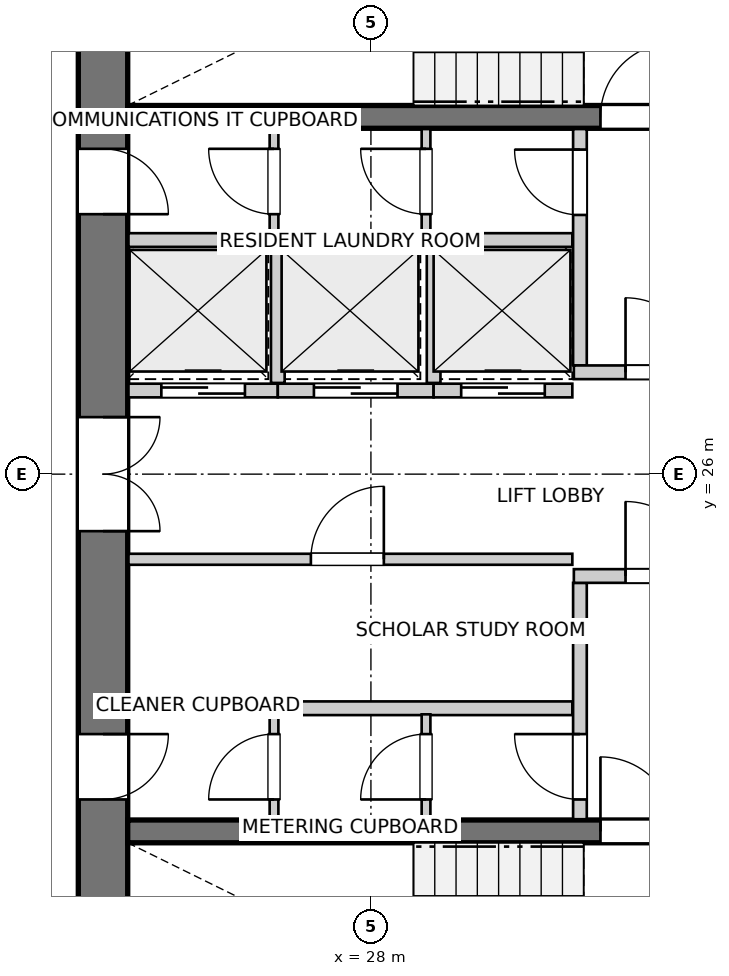
"""IFC4 building model, lengths in metres.
Left out: names, types, materials, properties, quantities, classifications, styles, units other than length and angle.
Written with IfcOpenShell. Run it as: python <this file> out.ifc"""

import sys

from ifc_helpers import new_model, si_unit, direction, frame, frame_2d, origin, place, context, subcontext, project, spatial, rectangle, extrude, source, transform, mapped, element, fill, save


model = new_model("IFC4")
c1 = context("Model", 3, precision=1e-05, world=origin(), true_north=direction((0.0, 1.0)))
c2 = subcontext(c1, "Body", "Model", "MODEL_VIEW")
j1 = project(units=[si_unit("LENGTHUNIT", "METRE"), si_unit("PLANEANGLEUNIT", "RADIAN")], contexts=[c1])
p1 = place(None, origin())
s1 = spatial("IfcSite", under=j1, at=p1, CompositionType="ELEMENT")
p2 = place(p1, origin())
s2 = spatial("IfcBuilding", under=s1, at=p2, CompositionType="ELEMENT")
p3 = place(p2, frame((0.0, 0.0, 152.2)))
s3 = spatial("IfcBuildingStorey", under=s2, at=p3, CompositionType="ELEMENT", Elevation=152.2)
p4 = place(p3, frame((24.475, 33.8, 0.0), z_axis=(0.0, 0.0, 1.0), x_axis=(0.0, -1.0, 0.0)))
e1 = element("IfcWall", 1, at=p4, inside=s3, PredefinedType="SHEAR", context=c2, shape_type="SweptSolid", body=[
    extrude(rectangle(XDim=15.6, YDim=0.65, at=frame_2d((7.8, 0.0))), origin(), (0.0, 0.0, 1.0), 2.935),
])
p5 = place(p4, frame((7.05, 0.0, 0.0)))
e2 = element("IfcOpeningElement", 2, at=p5, cuts=e1, PredefinedType="OPENING", context=c2, shape_type="SweptSolid", body=[
    extrude(rectangle(XDim=1.5, YDim=2.15, at=frame_2d((0.75, 1.075))), frame((0.0, 0.335, 0.0), z_axis=(0.0, -1.0, 0.0), x_axis=(1.0, 0.0, 0.0)), (0.0, 0.0, 1.0), 0.67),
])
p6 = place(p4, frame((3.52, 0.0, 0.0)))
e3 = element("IfcOpeningElement", 3, at=p6, cuts=e1, PredefinedType="OPENING", context=c2, shape_type="SweptSolid", body=[
    extrude(rectangle(XDim=0.86, YDim=2.05, at=frame_2d((0.43, 1.025))), frame((0.0, 0.335, 0.0), z_axis=(0.0, -1.0, 0.0), x_axis=(1.0, 0.0, 0.0)), (0.0, 0.0, 1.0), 0.67),
])
p7 = place(p4, frame((11.22, 0.0, 0.0)))
e4 = element("IfcOpeningElement", 4, at=p7, cuts=e1, PredefinedType="OPENING", context=c2, shape_type="SweptSolid", body=[
    extrude(rectangle(XDim=0.86, YDim=2.05, at=frame_2d((0.43, 1.025))), frame((0.0, 0.335, 0.0), z_axis=(0.0, -1.0, 0.0), x_axis=(1.0, 0.0, 0.0)), (0.0, 0.0, 1.0), 0.67),
])
p8 = place(p3, frame((24.8, 21.3, 0.0), z_axis=(0.0, 0.0, 1.0), x_axis=(1.0, 0.0, 0.0)))
e5 = element("IfcWall", 5, at=p8, inside=s3, PredefinedType="SHEAR", context=c2, shape_type="SweptSolid", body=[
    extrude(rectangle(XDim=11.1, YDim=0.3, at=frame_2d((5.55, 0.0))), origin(), (0.0, 0.0, 1.0), 2.935),
])
p9 = place(p8, frame((6.22, 0.0, 0.0)))
e6 = element("IfcOpeningElement", 6, at=p9, cuts=e5, PredefinedType="OPENING", context=c2, shape_type="SweptSolid", body=[
    extrude(rectangle(XDim=0.98, YDim=2.15, at=frame_2d((0.49, 1.075))), frame((0.0, 0.16, 0.0), z_axis=(0.0, -1.0, 0.0), x_axis=(1.0, 0.0, 0.0)), (0.0, 0.0, 1.0), 0.32),
])
p10 = place(p8, frame((9.15, 0.0, 0.0)))
e7 = element("IfcOpeningElement", 7, at=p10, cuts=e5, PredefinedType="OPENING", context=c2, shape_type="SweptSolid", body=[
    extrude(rectangle(XDim=1.15, YDim=2.15, at=frame_2d((0.575, 1.075))), frame((0.0, 0.16, 0.0), z_axis=(0.0, -1.0, 0.0), x_axis=(1.0, 0.0, 0.0)), (0.0, 0.0, 1.0), 0.32),
])
p11 = place(p3, frame((24.8, 30.7, 0.0), z_axis=(0.0, 0.0, 1.0), x_axis=(1.0, 0.0, 0.0)))
e8 = element("IfcWall", 8, at=p11, inside=s3, PredefinedType="SHEAR", context=c2, shape_type="SweptSolid", body=[
    extrude(rectangle(XDim=11.1, YDim=0.3, at=frame_2d((5.55, 0.0))), origin(), (0.0, 0.0, 1.0), 2.935),
])
p12 = place(p11, frame((6.22, 0.0, 0.0)))
e9 = element("IfcOpeningElement", 9, at=p12, cuts=e8, PredefinedType="OPENING", context=c2, shape_type="SweptSolid", body=[
    extrude(rectangle(XDim=0.98, YDim=2.15, at=frame_2d((0.49, 1.075))), frame((0.0, 0.16, 0.0), z_axis=(0.0, -1.0, 0.0), x_axis=(1.0, 0.0, 0.0)), (0.0, 0.0, 1.0), 0.32),
])
p13 = place(p11, frame((9.15, 0.0, 0.0)))
e10 = element("IfcOpeningElement", 10, at=p13, cuts=e8, PredefinedType="OPENING", context=c2, shape_type="SweptSolid", body=[
    extrude(rectangle(XDim=1.15, YDim=2.15, at=frame_2d((0.575, 1.075))), frame((0.0, 0.16, 0.0), z_axis=(0.0, -1.0, 0.0), x_axis=(1.0, 0.0, 0.0)), (0.0, 0.0, 1.0), 0.32),
])
p14 = place(p3, frame((30.75, 21.46, 0.0), z_axis=(0.0, 0.0, 1.0), x_axis=(0.0, 1.0, 0.0)))
e11 = element("IfcWall", 11, at=p14, inside=s3, PredefinedType="PARTITIONING", context=c2, shape_type="SweptSolid", body=[
    extrude(rectangle(XDim=3.11, YDim=0.18, at=frame_2d((1.555, 0.0))), origin(), (0.0, 0.0, 1.0), 2.935),
])
p15 = place(p14, frame((0.26, 0.0, 0.0)))
e12 = element("IfcOpeningElement", 12, at=p15, cuts=e11, PredefinedType="OPENING", context=c2, shape_type="SweptSolid", body=[
    extrude(rectangle(XDim=0.86, YDim=2.05, at=frame_2d((0.43, 1.025))), frame((0.0, 0.1, 0.0), z_axis=(0.0, -1.0, 0.0), x_axis=(1.0, 0.0, 0.0)), (0.0, 0.0, 1.0), 0.2),
])
p16 = place(p3, frame((30.67, 24.66, 0.0), z_axis=(0.0, 0.0, 1.0), x_axis=(1.0, 0.0, 0.0)))
e13 = element("IfcWall", 13, at=p16, inside=s3, PredefinedType="PARTITIONING", context=c2, shape_type="SweptSolid", body=[
    extrude(rectangle(XDim=5.22, YDim=0.18, at=frame_2d((2.61, 0.0))), origin(), (0.0, 0.0, 1.0), 2.935),
])
p17 = place(p16, frame((0.68, 0.0, 0.0)))
e14 = element("IfcOpeningElement", 14, at=p17, cuts=e13, PredefinedType="OPENING", context=c2, shape_type="SweptSolid", body=[
    extrude(rectangle(XDim=0.98, YDim=2.15, at=frame_2d((0.49, 1.075))), frame((0.0, 0.1, 0.0), z_axis=(0.0, -1.0, 0.0), x_axis=(1.0, 0.0, 0.0)), (0.0, 0.0, 1.0), 0.2),
])
p18 = place(p3, frame((30.75, 27.43, 0.0), z_axis=(0.0, 0.0, 1.0), x_axis=(0.0, 1.0, 0.0)))
e15 = element("IfcWall", 15, at=p18, inside=s3, PredefinedType="PARTITIONING", context=c2, shape_type="SweptSolid", body=[
    extrude(rectangle(XDim=3.11, YDim=0.18, at=frame_2d((1.555, 0.0))), origin(), (0.0, 0.0, 1.0), 2.935),
])
p19 = place(p18, frame((1.98, 0.0, 0.0)))
e16 = element("IfcOpeningElement", 16, at=p19, cuts=e15, PredefinedType="OPENING", context=c2, shape_type="SweptSolid", body=[
    extrude(rectangle(XDim=0.86, YDim=2.05, at=frame_2d((0.43, 1.025))), frame((0.0, 0.1, 0.0), z_axis=(0.0, -1.0, 0.0), x_axis=(1.0, 0.0, 0.0)), (0.0, 0.0, 1.0), 0.2),
])
p20 = place(p3, frame((30.67, 27.34, 0.0), z_axis=(0.0, 0.0, 1.0), x_axis=(1.0, 0.0, 0.0)))
e17 = element("IfcWall", 17, at=p20, inside=s3, PredefinedType="PARTITIONING", context=c2, shape_type="SweptSolid", body=[
    extrude(rectangle(XDim=5.22, YDim=0.18, at=frame_2d((2.61, 0.0))), origin(), (0.0, 0.0, 1.0), 2.935),
])
p21 = place(p20, frame((0.68, 0.0, 0.0)))
e18 = element("IfcOpeningElement", 18, at=p21, cuts=e17, PredefinedType="OPENING", context=c2, shape_type="SweptSolid", body=[
    extrude(rectangle(XDim=0.98, YDim=2.15, at=frame_2d((0.49, 1.075))), frame((0.0, 0.1, 0.0), z_axis=(0.0, -1.0, 0.0), x_axis=(1.0, 0.0, 0.0)), (0.0, 0.0, 1.0), 0.2),
])
p22 = place(p3, frame((24.81, 22.92, 0.0), z_axis=(0.0, 0.0, 1.0), x_axis=(1.0, 0.0, 0.0)))
e19 = element("IfcWall", 19, at=p22, inside=s3, PredefinedType="PARTITIONING", context=c2, shape_type="SweptSolid", body=[
    extrude(rectangle(XDim=5.84, YDim=0.18, at=frame_2d((2.92, 0.0))), origin(), (0.0, 0.0, 1.0), 2.935),
])
p23 = place(p3, frame((24.81, 24.88, 0.0), z_axis=(0.0, 0.0, 1.0), x_axis=(1.0, 0.0, 0.0)))
e20 = element("IfcWall", 20, at=p23, inside=s3, PredefinedType="PARTITIONING", context=c2, shape_type="SweptSolid", body=[
    extrude(rectangle(XDim=5.84, YDim=0.145, at=frame_2d((2.92, 0.0))), origin(), (0.0, 0.0, 1.0), 2.935),
])
p24 = place(p23, frame((2.4, 0.0, 0.0)))
e21 = element("IfcOpeningElement", 21, at=p24, cuts=e20, PredefinedType="OPENING", context=c2, shape_type="SweptSolid", body=[
    extrude(rectangle(XDim=0.96, YDim=2.1, at=frame_2d((0.48, 1.05))), frame((0.0, 0.083, 0.0), z_axis=(0.0, -1.0, 0.0), x_axis=(1.0, 0.0, 0.0)), (0.0, 0.0, 1.0), 0.165),
])
p25 = place(p3, frame((24.81, 29.08, 0.0), z_axis=(0.0, 0.0, 1.0), x_axis=(1.0, 0.0, 0.0)))
e22 = element("IfcWall", 22, at=p25, inside=s3, PredefinedType="PARTITIONING", context=c2, shape_type="SweptSolid", body=[
    extrude(rectangle(XDim=5.84, YDim=0.18, at=frame_2d((2.92, 0.0))), origin(), (0.0, 0.0, 1.0), 2.935),
])
p26 = place(p3, frame((24.81, 27.1, 0.0), z_axis=(0.0, 0.0, 1.0), x_axis=(1.0, 0.0, 0.0)))
e23 = element("IfcWall", 23, at=p26, inside=s3, PredefinedType="PARTITIONING", context=c2, shape_type="SweptSolid", body=[
    extrude(rectangle(XDim=1.965, YDim=0.18, at=frame_2d((0.982, 0.0))), origin(), (0.0, 0.0, 1.0), 2.935),
])
p27 = place(p26, frame((0.433, 0.0, 0.0)))
e24 = element("IfcOpeningElement", 24, at=p27, cuts=e23, PredefinedType="OPENING", context=c2, shape_type="SweptSolid", body=[
    extrude(rectangle(XDim=1.1, YDim=2.15, at=frame_2d((0.55, 1.075))), frame((0.0, 0.1, 0.0), z_axis=(0.0, -1.0, 0.0), x_axis=(1.0, 0.0, 0.0)), (0.0, 0.0, 1.0), 0.2),
])
p28 = place(p3, frame((26.775, 27.1, 0.0), z_axis=(0.0, 0.0, 1.0), x_axis=(1.0, 0.0, 0.0)))
e25 = element("IfcWall", 25, at=p28, inside=s3, PredefinedType="PARTITIONING", context=c2, shape_type="SweptSolid", body=[
    extrude(rectangle(XDim=2.05, YDim=0.18, at=frame_2d((1.025, 0.0))), origin(), (0.0, 0.0, 1.0), 2.935),
])
p29 = place(p28, frame((0.475, 0.0, 0.0)))
e26 = element("IfcOpeningElement", 26, at=p29, cuts=e25, PredefinedType="OPENING", context=c2, shape_type="SweptSolid", body=[
    extrude(rectangle(XDim=1.1, YDim=2.15, at=frame_2d((0.55, 1.075))), frame((0.0, 0.1, 0.0), z_axis=(0.0, -1.0, 0.0), x_axis=(1.0, 0.0, 0.0)), (0.0, 0.0, 1.0), 0.2),
])
p30 = place(p3, frame((26.775, 27.2, 0.0), z_axis=(0.0, 0.0, 1.0), x_axis=(0.0, 1.0, 0.0)))
e27 = element("IfcWall", 27, at=p30, inside=s3, PredefinedType="PARTITIONING", context=c2, shape_type="SweptSolid", body=[
    extrude(rectangle(XDim=1.78, YDim=0.18, at=frame_2d((0.89, 0.0))), origin(), (0.0, 0.0, 1.0), 2.935),
])
p31 = place(p3, frame((28.825, 27.1, 0.0), z_axis=(0.0, 0.0, 1.0), x_axis=(1.0, 0.0, 0.0)))
e28 = element("IfcWall", 28, at=p31, inside=s3, PredefinedType="PARTITIONING", context=c2, shape_type="SweptSolid", body=[
    extrude(rectangle(XDim=1.825, YDim=0.18, at=frame_2d((0.913, 0.0))), origin(), (0.0, 0.0, 1.0), 2.935),
])
p32 = place(p31, frame((0.363, 0.0, 0.0)))
e29 = element("IfcOpeningElement", 29, at=p32, cuts=e28, PredefinedType="OPENING", context=c2, shape_type="SweptSolid", body=[
    extrude(rectangle(XDim=1.1, YDim=2.15, at=frame_2d((0.55, 1.075))), frame((0.0, 0.1, 0.0), z_axis=(0.0, -1.0, 0.0), x_axis=(1.0, 0.0, 0.0)), (0.0, 0.0, 1.0), 0.2),
])
p33 = place(p3, frame((28.825, 27.2, 0.0), z_axis=(0.0, 0.0, 1.0), x_axis=(0.0, 1.0, 0.0)))
e30 = element("IfcWall", 30, at=p33, inside=s3, PredefinedType="PARTITIONING", context=c2, shape_type="SweptSolid", body=[
    extrude(rectangle(XDim=1.78, YDim=0.18, at=frame_2d((0.89, 0.0))), origin(), (0.0, 0.0, 1.0), 2.935),
])
p34 = place(p3, frame((26.725, 21.46, 0.0), z_axis=(0.0, 0.0, 1.0), x_axis=(0.0, 1.0, 0.0)))
e31 = element("IfcWall", 31, at=p34, inside=s3, PredefinedType="PARTITIONING", context=c2, shape_type="SweptSolid", body=[
    extrude(rectangle(XDim=1.38, YDim=0.115, at=frame_2d((0.69, 0.0))), origin(), (0.0, 0.0, 1.0), 2.935),
])
p35 = place(p34, frame((0.26, 0.0, 0.0)))
e32 = element("IfcOpeningElement", 32, at=p35, cuts=e31, PredefinedType="OPENING", context=c2, shape_type="SweptSolid", body=[
    extrude(rectangle(XDim=0.86, YDim=2.05, at=frame_2d((0.43, 1.025))), frame((0.0, 0.067, 0.0), z_axis=(0.0, -1.0, 0.0), x_axis=(1.0, 0.0, 0.0)), (0.0, 0.0, 1.0), 0.135),
])
p36 = place(p3, frame((26.725, 29.16, 0.0), z_axis=(0.0, 0.0, 1.0), x_axis=(0.0, 1.0, 0.0)))
e33 = element("IfcWall", 33, at=p36, inside=s3, PredefinedType="PARTITIONING", context=c2, shape_type="SweptSolid", body=[
    extrude(rectangle(XDim=1.38, YDim=0.115, at=frame_2d((0.69, 0.0))), origin(), (0.0, 0.0, 1.0), 2.935),
])
p37 = place(p36, frame((0.26, 0.0, 0.0)))
e34 = element("IfcOpeningElement", 34, at=p37, cuts=e33, PredefinedType="OPENING", context=c2, shape_type="SweptSolid", body=[
    extrude(rectangle(XDim=0.86, YDim=2.05, at=frame_2d((0.43, 1.025))), frame((0.0, 0.067, 0.0), z_axis=(0.0, -1.0, 0.0), x_axis=(1.0, 0.0, 0.0)), (0.0, 0.0, 1.0), 0.135),
])
p38 = place(p3, frame((28.725, 21.46, 0.0), z_axis=(0.0, 0.0, 1.0), x_axis=(0.0, 1.0, 0.0)))
e35 = element("IfcWall", 35, at=p38, inside=s3, PredefinedType="PARTITIONING", context=c2, shape_type="SweptSolid", body=[
    extrude(rectangle(XDim=1.38, YDim=0.115, at=frame_2d((0.69, 0.0))), origin(), (0.0, 0.0, 1.0), 2.935),
])
p39 = place(p38, frame((0.26, 0.0, 0.0)))
e36 = element("IfcOpeningElement", 36, at=p39, cuts=e35, PredefinedType="OPENING", context=c2, shape_type="SweptSolid", body=[
    extrude(rectangle(XDim=0.86, YDim=2.05, at=frame_2d((0.43, 1.025))), frame((0.0, 0.067, 0.0), z_axis=(0.0, -1.0, 0.0), x_axis=(1.0, 0.0, 0.0)), (0.0, 0.0, 1.0), 0.135),
])
p40 = place(p3, frame((28.725, 29.16, 0.0), z_axis=(0.0, 0.0, 1.0), x_axis=(0.0, 1.0, 0.0)))
e37 = element("IfcWall", 37, at=p40, inside=s3, PredefinedType="PARTITIONING", context=c2, shape_type="SweptSolid", body=[
    extrude(rectangle(XDim=1.38, YDim=0.115, at=frame_2d((0.69, 0.0))), origin(), (0.0, 0.0, 1.0), 2.935),
])
p41 = place(p40, frame((0.26, 0.0, 0.0)))
e38 = element("IfcOpeningElement", 38, at=p41, cuts=e37, PredefinedType="OPENING", context=c2, shape_type="SweptSolid", body=[
    extrude(rectangle(XDim=0.86, YDim=2.05, at=frame_2d((0.43, 1.025))), frame((0.0, 0.067, 0.0), z_axis=(0.0, -1.0, 0.0), x_axis=(1.0, 0.0, 0.0)), (0.0, 0.0, 1.0), 0.135),
])
m1 = source(origin(), c2, "Body", "SweptSolid", [
    extrude(rectangle(XDim=0.98, YDim=2.15, at=frame_2d((0.49, 1.075))), frame((0.0, 0.025, 0.0), z_axis=(0.0, -1.0, 0.0), x_axis=(1.0, 0.0, 0.0)), (0.0, 0.0, 1.0), 0.05),
])
p42 = place(p9, origin())
e39 = element("IfcDoor", 39, at=p42, inside=s3, OperationType="SINGLE_SWING_LEFT", PredefinedType="DOOR", context=c2, shape_type="MappedRepresentation", body=[
    mapped(m1, transform((0.0, 0.0, 0.0), x_axis=(1.0, 0.0, 0.0), y_axis=(0.0, 1.0, 0.0), z_axis=(0.0, 0.0, 1.0), scale=1.0)),
])
fill(e6, e39)
p43 = place(p12, origin())
e40 = element("IfcDoor", 40, at=p43, inside=s3, OperationType="SINGLE_SWING_RIGHT", PredefinedType="DOOR", context=c2, shape_type="MappedRepresentation", body=[
    mapped(m1, transform((0.0, 0.0, 0.0), x_axis=(1.0, 0.0, 0.0), y_axis=(0.0, 1.0, 0.0), z_axis=(0.0, 0.0, 1.0), scale=1.0)),
])
fill(e9, e40)
m2 = source(origin(), c2, "Body", "SweptSolid", [
    extrude(rectangle(XDim=1.5, YDim=2.15, at=frame_2d((0.75, 1.075))), frame((0.0, 0.025, 0.0), z_axis=(0.0, -1.0, 0.0), x_axis=(1.0, 0.0, 0.0)), (0.0, 0.0, 1.0), 0.05),
])
p44 = place(p5, origin())
e41 = element("IfcDoor", 41, at=p44, inside=s3, OperationType="DOUBLE_DOOR_SINGLE_SWING", PredefinedType="DOOR", context=c2, shape_type="MappedRepresentation", body=[
    mapped(m2, transform((0.0, 0.0, 0.0), x_axis=(1.0, 0.0, 0.0), y_axis=(0.0, 1.0, 0.0), z_axis=(0.0, 0.0, 1.0), scale=1.0)),
])
fill(e2, e41)
m3 = source(origin(), c2, "Body", "SweptSolid", [
    extrude(rectangle(XDim=0.86, YDim=2.05, at=frame_2d((0.43, 1.025))), frame((0.0, 0.025, 0.0), z_axis=(0.0, -1.0, 0.0), x_axis=(1.0, 0.0, 0.0)), (0.0, 0.0, 1.0), 0.05),
])
p45 = place(p6, origin())
e42 = element("IfcDoor", 42, at=p45, inside=s3, OperationType="SINGLE_SWING_RIGHT", PredefinedType="DOOR", context=c2, shape_type="MappedRepresentation", body=[
    mapped(m3, transform((0.0, 0.0, 0.0), x_axis=(1.0, 0.0, 0.0), y_axis=(0.0, 1.0, 0.0), z_axis=(0.0, 0.0, 1.0), scale=1.0)),
])
fill(e3, e42)
p46 = place(p7, origin())
e43 = element("IfcDoor", 43, at=p46, inside=s3, OperationType="SINGLE_SWING_LEFT", PredefinedType="DOOR", context=c2, shape_type="MappedRepresentation", body=[
    mapped(m3, transform((0.0, 0.0, 0.0), x_axis=(1.0, 0.0, 0.0), y_axis=(0.0, 1.0, 0.0), z_axis=(0.0, 0.0, 1.0), scale=1.0)),
])
fill(e4, e43)
p47 = place(p15, origin())
e44 = element("IfcDoor", 44, at=p47, inside=s3, OperationType="SINGLE_SWING_RIGHT", PredefinedType="DOOR", context=c2, shape_type="MappedRepresentation", body=[
    mapped(m3, transform((0.0, 0.0, 0.0), x_axis=(1.0, 0.0, 0.0), y_axis=(0.0, 1.0, 0.0), z_axis=(0.0, 0.0, 1.0), scale=1.0)),
])
fill(e12, e44)
p48 = place(p17, origin())
e45 = element("IfcDoor", 45, at=p48, inside=s3, OperationType="SINGLE_SWING_LEFT", PredefinedType="DOOR", context=c2, shape_type="MappedRepresentation", body=[
    mapped(m1, transform((0.0, 0.0, 0.0), x_axis=(1.0, 0.0, 0.0), y_axis=(0.0, 1.0, 0.0), z_axis=(0.0, 0.0, 1.0), scale=1.0)),
])
fill(e14, e45)
p49 = place(p19, origin())
e46 = element("IfcDoor", 46, at=p49, inside=s3, OperationType="SINGLE_SWING_RIGHT", PredefinedType="DOOR", context=c2, shape_type="MappedRepresentation", body=[
    mapped(m3, transform((0.0, 0.0, 0.0), x_axis=(1.0, 0.0, 0.0), y_axis=(0.0, 1.0, 0.0), z_axis=(0.0, 0.0, 1.0), scale=1.0)),
])
fill(e16, e46)
p50 = place(p21, origin())
e47 = element("IfcDoor", 47, at=p50, inside=s3, OperationType="SINGLE_SWING_LEFT", PredefinedType="DOOR", context=c2, shape_type="MappedRepresentation", body=[
    mapped(m1, transform((0.0, 0.0, 0.0), x_axis=(1.0, 0.0, 0.0), y_axis=(0.0, 1.0, 0.0), z_axis=(0.0, 0.0, 1.0), scale=1.0)),
])
fill(e18, e47)
m4 = source(origin(), c2, "Body", "SweptSolid", [
    extrude(rectangle(XDim=0.96, YDim=2.1, at=frame_2d((0.48, 1.05))), frame((0.0, 0.025, 0.0), z_axis=(0.0, -1.0, 0.0), x_axis=(1.0, 0.0, 0.0)), (0.0, 0.0, 1.0), 0.05),
])
p51 = place(p24, origin())
e48 = element("IfcDoor", 48, at=p51, inside=s3, OperationType="SINGLE_SWING_RIGHT", PredefinedType="DOOR", context=c2, shape_type="MappedRepresentation", body=[
    mapped(m4, transform((0.0, 0.0, 0.0), x_axis=(1.0, 0.0, 0.0), y_axis=(0.0, 1.0, 0.0), z_axis=(0.0, 0.0, 1.0), scale=1.0)),
])
fill(e21, e48)
m5 = source(origin(), c2, "Body", "SweptSolid", [
    extrude(rectangle(XDim=1.1, YDim=2.15, at=frame_2d((0.55, 1.075))), frame((0.0, 0.025, 0.0), z_axis=(0.0, -1.0, 0.0), x_axis=(1.0, 0.0, 0.0)), (0.0, 0.0, 1.0), 0.05),
])
p52 = place(p27, origin())
e49 = element("IfcDoor", 49, at=p52, inside=s3, OperationType="DOUBLE_DOOR_SLIDING", PredefinedType="DOOR", context=c2, shape_type="MappedRepresentation", body=[
    mapped(m5, transform((0.0, 0.0, 0.0), x_axis=(1.0, 0.0, 0.0), y_axis=(0.0, 1.0, 0.0), z_axis=(0.0, 0.0, 1.0), scale=1.0)),
])
fill(e24, e49)
p53 = place(p29, origin())
e50 = element("IfcDoor", 50, at=p53, inside=s3, OperationType="DOUBLE_DOOR_SLIDING", PredefinedType="DOOR", context=c2, shape_type="MappedRepresentation", body=[
    mapped(m5, transform((0.0, 0.0, 0.0), x_axis=(1.0, 0.0, 0.0), y_axis=(0.0, 1.0, 0.0), z_axis=(0.0, 0.0, 1.0), scale=1.0)),
])
fill(e26, e50)
p54 = place(p32, origin())
e51 = element("IfcDoor", 51, at=p54, inside=s3, OperationType="DOUBLE_DOOR_SLIDING", PredefinedType="DOOR", context=c2, shape_type="MappedRepresentation", body=[
    mapped(m5, transform((0.0, 0.0, 0.0), x_axis=(1.0, 0.0, 0.0), y_axis=(0.0, 1.0, 0.0), z_axis=(0.0, 0.0, 1.0), scale=1.0)),
])
fill(e29, e51)
p55 = place(p35, origin())
e52 = element("IfcDoor", 52, at=p55, inside=s3, OperationType="SINGLE_SWING_LEFT", PredefinedType="DOOR", context=c2, shape_type="MappedRepresentation", body=[
    mapped(m3, transform((0.0, 0.0, 0.0), x_axis=(1.0, 0.0, 0.0), y_axis=(0.0, 1.0, 0.0), z_axis=(0.0, 0.0, 1.0), scale=1.0)),
])
fill(e32, e52)
p56 = place(p37, origin())
e53 = element("IfcDoor", 53, at=p56, inside=s3, OperationType="SINGLE_SWING_RIGHT", PredefinedType="DOOR", context=c2, shape_type="MappedRepresentation", body=[
    mapped(m3, transform((0.0, 0.0, 0.0), x_axis=(1.0, 0.0, 0.0), y_axis=(0.0, 1.0, 0.0), z_axis=(0.0, 0.0, 1.0), scale=1.0)),
])
fill(e34, e53)
p57 = place(p39, origin())
e54 = element("IfcDoor", 54, at=p57, inside=s3, OperationType="SINGLE_SWING_LEFT", PredefinedType="DOOR", context=c2, shape_type="MappedRepresentation", body=[
    mapped(m3, transform((0.0, 0.0, 0.0), x_axis=(1.0, 0.0, 0.0), y_axis=(0.0, 1.0, 0.0), z_axis=(0.0, 0.0, 1.0), scale=1.0)),
])
fill(e36, e54)
p58 = place(p41, origin())
e55 = element("IfcDoor", 55, at=p58, inside=s3, OperationType="SINGLE_SWING_RIGHT", PredefinedType="DOOR", context=c2, shape_type="MappedRepresentation", body=[
    mapped(m3, transform((0.0, 0.0, 0.0), x_axis=(1.0, 0.0, 0.0), y_axis=(0.0, 1.0, 0.0), z_axis=(0.0, 0.0, 1.0), scale=1.0)),
])
fill(e38, e55)
save(model, sys.argv[1])
